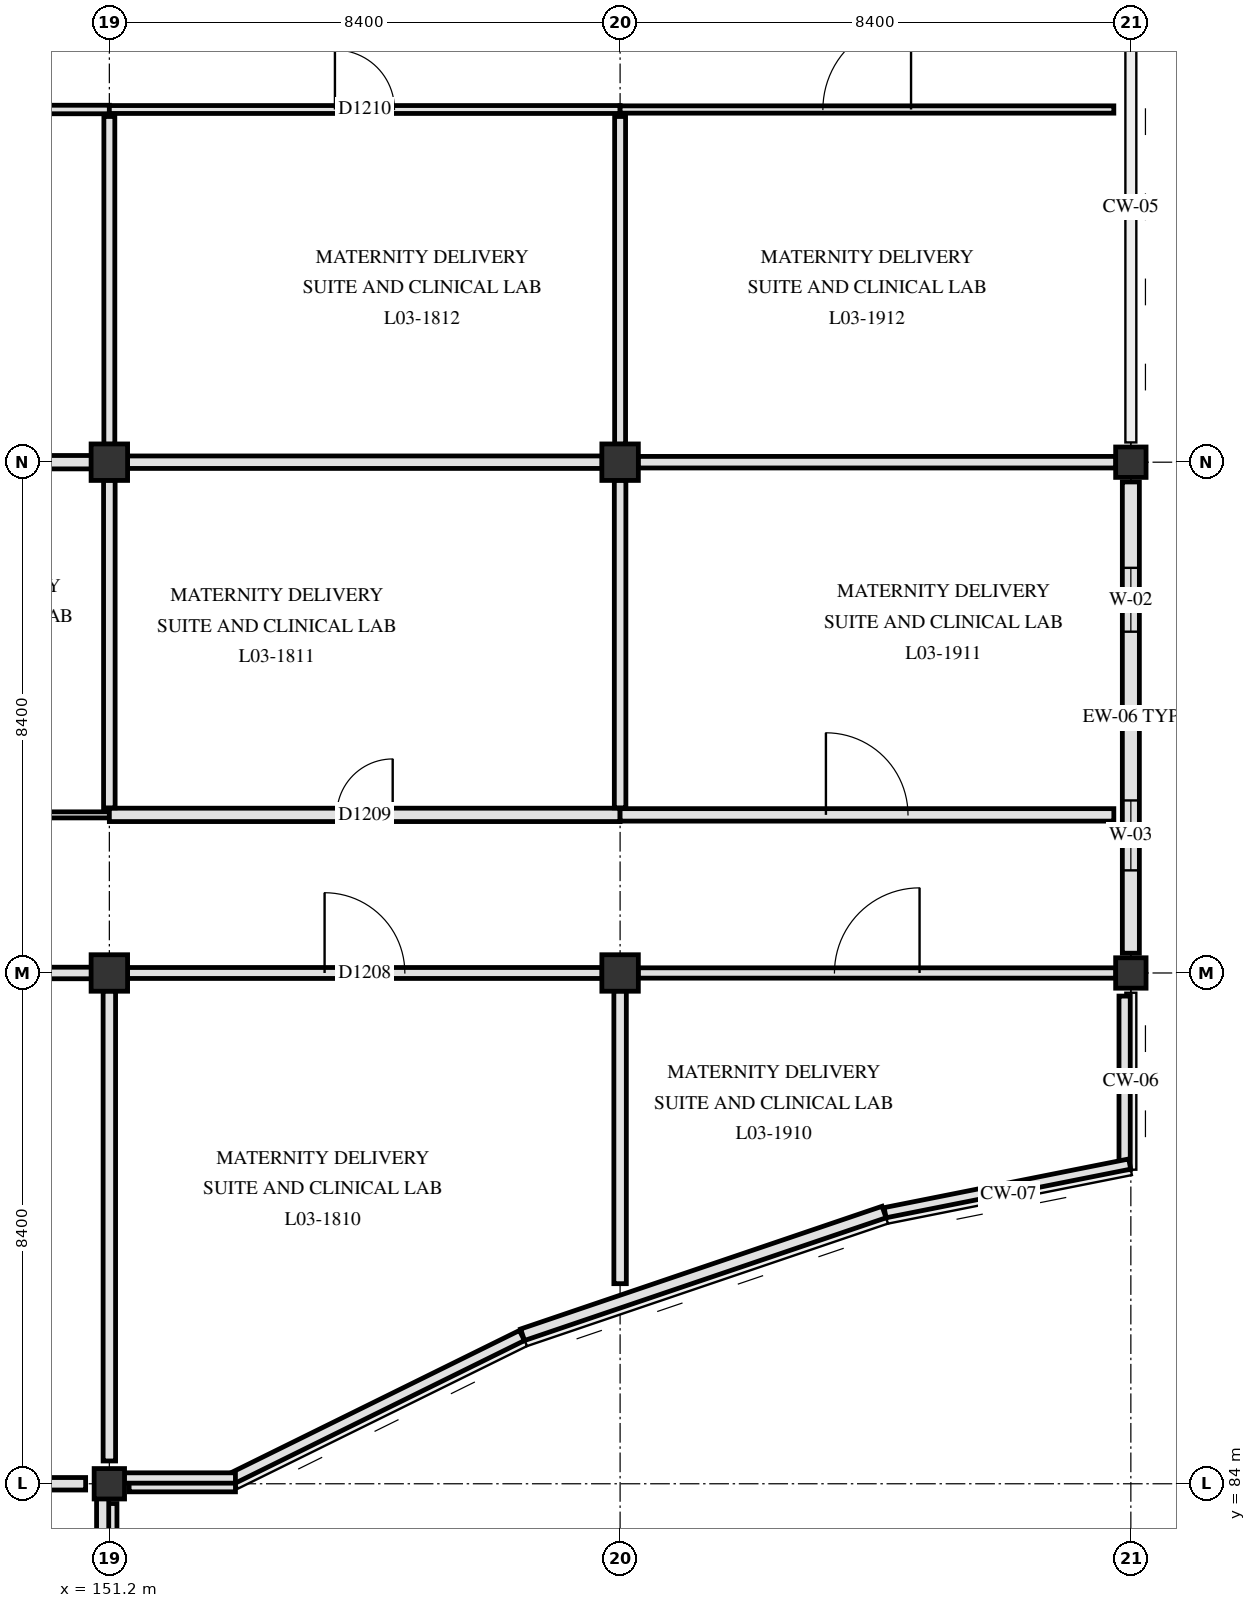
"""IFC4 building model, lengths in metres.
Left out: names, types, materials, properties, quantities, classifications, styles, units other than length and angle.
Written with IfcOpenShell. Run it as: python <this file> out.ifc"""

import sys

from ifc_helpers import new_model, si_unit, direction, frame, frame_2d, origin, origin_2d, place, context, subcontext, project, spatial, rectangle, extrude, element, fill, save


model = new_model("IFC4")
c1 = context("Model", 3, precision=1e-05, world=origin(), true_north=direction((0.0, 1.0)))
c2 = subcontext(c1, "Body", "Model", "MODEL_VIEW")
j1 = project(units=[si_unit("LENGTHUNIT", "METRE"), si_unit("PLANEANGLEUNIT", "RADIAN")], contexts=[c1])
p1 = place(None, origin())
s1 = spatial("IfcSite", under=j1, at=p1, CompositionType="ELEMENT")
p2 = place(p1, origin())
s2 = spatial("IfcBuilding", under=s1, at=p2, CompositionType="ELEMENT")
p3 = place(p2, frame((0.0, 0.0, 14.4)))
s3 = spatial("IfcBuildingStorey", under=s2, at=p3, CompositionType="ELEMENT", Elevation=14.4)
p4 = place(p3, frame((151.2, 84.0, 0.0), z_axis=(0.0, 0.0, 1.0), x_axis=(1.0, 0.0, 0.0)))
e1 = element("IfcColumn", 1, at=p4, inside=s3, PredefinedType="COLUMN", context=c2, shape_type="SweptSolid", body=[
    extrude(rectangle(XDim=0.5, YDim=0.5, at=origin_2d()), origin(), (0.0, 0.0, 1.0), 4.2),
])
for number, where, z_axis, x_axis in (
    (2, (151.2, 92.4, 0.0), (0.0, 0.0, 1.0), (1.0, 0.0, 0.0)),
    (3, (151.2, 100.8, 0.0), (0.0, 0.0, 1.0), (1.0, 0.0, 0.0)),
    (4, (159.6, 92.4, 0.0), (0.0, 0.0, 1.0), (1.0, 0.0, 0.0)),
    (5, (159.6, 100.8, 0.0), (0.0, 0.0, 1.0), (1.0, 0.0, 0.0)),
):
    element("IfcColumn", number, at=place(p3, frame(where, z_axis=z_axis, x_axis=x_axis)), inside=s3, PredefinedType="COLUMN", context=c2, shape_type="SweptSolid", body=[
        extrude(rectangle(XDim=0.6, YDim=0.6, at=origin_2d()), origin(), (0.0, 0.0, 1.0), 4.2),
    ])
for number, where, z_axis, x_axis in (
    (6, (168.0, 92.4, 0.0), (0.0, 0.0, 1.0), (1.0, 0.0, 0.0)),
    (7, (168.0, 100.8, 0.0), (0.0, 0.0, 1.0), (1.0, 0.0, 0.0)),
):
    element("IfcColumn", number, at=place(p3, frame(where, z_axis=z_axis, x_axis=x_axis)), inside=s3, PredefinedType="COLUMN", context=c2, shape_type="SweptSolid", body=[
        extrude(rectangle(XDim=0.5, YDim=0.5, at=origin_2d()), origin(), (0.0, 0.0, 1.0), 4.2),
    ])
p5 = place(p3, frame((168.0, 100.475, 0.0), z_axis=(0.0, 0.0, 1.0), x_axis=(0.0, -1.0, 0.0)))
e8 = element("IfcWall", 8, at=p5, inside=s3, PredefinedType="SOLIDWALL", context=c2, shape_type="SweptSolid", body=[
    extrude(rectangle(XDim=7.75, YDim=0.28, at=frame_2d((3.875, 0.0))), origin(), (0.0, 0.0, 1.0), 2.89),
])
p6 = place(p5, frame((1.413, 0.0, 0.85)))
e9 = element("IfcOpeningElement", 9, at=p6, cuts=e8, PredefinedType="OPENING", context=c2, shape_type="SweptSolid", body=[
    extrude(rectangle(XDim=1.05, YDim=1.3, at=frame_2d((0.525, 0.65))), frame((0.0, 0.15, 0.0), z_axis=(0.0, -1.0, 0.0), x_axis=(1.0, 0.0, 0.0)), (0.0, 0.0, 1.0), 0.3),
])
p7 = place(p5, frame((5.238, 0.0, 0.85)))
e10 = element("IfcOpeningElement", 10, at=p7, cuts=e8, PredefinedType="OPENING", context=c2, shape_type="SweptSolid", body=[
    extrude(rectangle(XDim=1.15, YDim=1.3, at=frame_2d((0.575, 0.65))), frame((0.0, 0.15, 0.0), z_axis=(0.0, -1.0, 0.0), x_axis=(1.0, 0.0, 0.0)), (0.0, 0.0, 1.0), 0.3),
])
p8 = place(p3, frame((153.274, 84.0, 0.0), z_axis=(0.0, 0.0, 1.0), x_axis=(-1.0, 0.0, 0.0)))
e11 = element("IfcWall", 11, at=p8, inside=s3, PredefinedType="SOLIDWALL", context=c2, shape_type="SweptSolid", body=[
    extrude(rectangle(XDim=1.749, YDim=0.265, at=frame_2d((0.875, 0.0))), origin(), (0.0, 0.0, 1.0), 3.89),
])
p9 = place(p3, frame((151.2, 83.675, 0.0), z_axis=(0.0, 0.0, 1.0), x_axis=(0.0, -1.0, 0.0)))
e12 = element("IfcWall", 12, at=p9, inside=s3, PredefinedType="SOLIDWALL", context=c2, shape_type="SweptSolid", body=[
    extrude(rectangle(XDim=0.908, YDim=0.25, at=frame_2d((0.454, 0.0))), origin(), (0.0, 0.0, 1.0), 3.89),
])
p10 = place(p3, frame((167.897, 92.02, 4.18), z_axis=(0.0, 0.0, 1.0), x_axis=(0.0, -1.0, 0.0)))
e13 = element("IfcWall", 13, at=p10, inside=s3, PredefinedType="PARAPET", context=c2, shape_type="SweptSolid", body=[
    extrude(rectangle(XDim=2.855, YDim=0.185, at=frame_2d((1.428, 0.0))), origin(), (0.0, 0.0, 1.0), 1.17),
])
p11 = place(p3, frame((167.981, 89.258, 4.18), z_axis=(0.0, 0.0, 1.0), x_axis=(-0.980783878523, -0.19509736961, 0.0)))
e14 = element("IfcWall", 14, at=p11, inside=s3, PredefinedType="PARAPET", context=c2, shape_type="SweptSolid", body=[
    extrude(rectangle(XDim=4.102, YDim=0.17, at=frame_2d((2.051, 0.0))), origin(), (0.0, 0.0, 1.0), 1.17),
])
p12 = place(p3, frame((163.941, 88.469, 4.18), z_axis=(0.0, 0.0, 1.0), x_axis=(-0.946938763932, -0.32141402795, 0.0)))
e15 = element("IfcWall", 15, at=p12, inside=s3, PredefinedType="PARAPET", context=c2, shape_type="SweptSolid", body=[
    extrude(rectangle(XDim=6.279, YDim=0.2, at=frame_2d((3.139, 0.0))), origin(), (0.0, 0.0, 1.0), 1.17),
])
p13 = place(p3, frame((157.986, 86.438, 4.18), z_axis=(0.0, 0.0, 1.0), x_axis=(-0.896871370763, -0.442291469854, 0.0)))
e16 = element("IfcWall", 16, at=p13, inside=s3, PredefinedType="PARAPET", context=c2, shape_type="SweptSolid", body=[
    extrude(rectangle(XDim=5.305, YDim=0.185, at=frame_2d((2.652, 0.0))), origin(), (0.0, 0.0, 1.0), 1.17),
])
p14 = place(p3, frame((153.274, 84.095, 4.18), z_axis=(0.0, 0.0, 1.0), x_axis=(-1.0, 0.0, 0.0)))
e17 = element("IfcWall", 17, at=p14, inside=s3, PredefinedType="PARAPET", context=c2, shape_type="SweptSolid", body=[
    extrude(rectangle(XDim=2.074, YDim=0.17, at=frame_2d((1.037, 0.0))), origin(), (0.0, 0.0, 1.0), 1.17),
])
p15 = place(p3, frame((151.09, 84.0, 4.18), z_axis=(0.0, 0.0, 1.0), x_axis=(0.0, -1.0, 0.0)))
e18 = element("IfcWall", 18, at=p15, inside=s3, PredefinedType="PARAPET", context=c2, shape_type="SweptSolid", body=[
    extrude(rectangle(XDim=1.233, YDim=0.2, at=frame_2d((0.616, 0.0))), origin(), (0.0, 0.0, 1.0), 1.17),
])
p16 = place(p3, frame((143.045, 84.0, 0.0), z_axis=(0.0, 0.0, 1.0), x_axis=(1.0, 0.0, 0.0)))
e19 = element("IfcWall", 19, at=p16, inside=s3, PredefinedType="PARTITIONING", context=c2, shape_type="SweptSolid", body=[
    extrude(rectangle(XDim=7.765, YDim=0.205, at=frame_2d((3.883, 0.0))), origin(), (0.0, 0.0, 1.0), 3.29),
])
p17 = place(p16, frame((3.258, 0.0, 0.0)))
e20 = element("IfcOpeningElement", 20, at=p17, cuts=e19, PredefinedType="OPENING", context=c2, shape_type="SweptSolid", body=[
    extrude(rectangle(XDim=1.25, YDim=2.2, at=frame_2d((0.625, 1.1))), frame((0.0, 0.113, 0.0), z_axis=(0.0, -1.0, 0.0), x_axis=(1.0, 0.0, 0.0)), (0.0, 0.0, 1.0), 0.225),
])
p18 = place(p3, frame((143.095, 92.4, 0.0), z_axis=(0.0, 0.0, 1.0), x_axis=(1.0, 0.0, 0.0)))
e21 = element("IfcWall", 21, at=p18, inside=s3, PredefinedType="PARTITIONING", context=c2, shape_type="SweptSolid", body=[
    extrude(rectangle(XDim=7.81, YDim=0.19, at=frame_2d((3.905, 0.0))), origin(), (0.0, 0.0, 1.0), 2.89),
])
p19 = place(p18, frame((3.255, 0.0, 0.0)))
e22 = element("IfcOpeningElement", 22, at=p19, cuts=e21, PredefinedType="OPENING", context=c2, shape_type="SweptSolid", body=[
    extrude(rectangle(XDim=1.3, YDim=2.2, at=frame_2d((0.65, 1.1))), frame((0.0, 0.105, 0.0), z_axis=(0.0, -1.0, 0.0), x_axis=(1.0, 0.0, 0.0)), (0.0, 0.0, 1.0), 0.21),
])
p20 = place(p3, frame((151.495, 92.4, 0.0), z_axis=(0.0, 0.0, 1.0), x_axis=(1.0, 0.0, 0.0)))
e23 = element("IfcWall", 23, at=p20, inside=s3, PredefinedType="PARTITIONING", context=c2, shape_type="SweptSolid", body=[
    extrude(rectangle(XDim=7.81, YDim=0.18, at=frame_2d((3.905, 0.0))), origin(), (0.0, 0.0, 1.0), 2.89),
])
p21 = place(p20, frame((3.245, 0.0, 0.0)))
e24 = element("IfcOpeningElement", 24, at=p21, cuts=e23, PredefinedType="OPENING", context=c2, shape_type="SweptSolid", body=[
    extrude(rectangle(XDim=1.32, YDim=2.18, at=frame_2d((0.66, 1.09))), frame((0.0, 0.1, 0.0), z_axis=(0.0, -1.0, 0.0), x_axis=(1.0, 0.0, 0.0)), (0.0, 0.0, 1.0), 0.2),
])
p22 = place(p3, frame((159.895, 92.4, 0.0), z_axis=(0.0, 0.0, 1.0), x_axis=(1.0, 0.0, 0.0)))
e25 = element("IfcWall", 25, at=p22, inside=s3, PredefinedType="PARTITIONING", context=c2, shape_type="SweptSolid", body=[
    extrude(rectangle(XDim=7.86, YDim=0.17, at=frame_2d((3.93, 0.0))), origin(), (0.0, 0.0, 1.0), 2.89),
])
p23 = place(p22, frame((3.23, 0.0, 0.0)))
e26 = element("IfcOpeningElement", 26, at=p23, cuts=e25, PredefinedType="OPENING", context=c2, shape_type="SweptSolid", body=[
    extrude(rectangle(XDim=1.4, YDim=2.2, at=frame_2d((0.7, 1.1))), frame((0.0, 0.095, 0.0), z_axis=(0.0, -1.0, 0.0), x_axis=(1.0, 0.0, 0.0)), (0.0, 0.0, 1.0), 0.19),
])
p24 = place(p3, frame((142.8, 95.0, 0.0), z_axis=(0.0, 0.0, 1.0), x_axis=(1.0, 0.0, 0.0)))
e27 = element("IfcWall", 27, at=p24, inside=s3, PredefinedType="PARTITIONING", context=c2, shape_type="SweptSolid", body=[
    extrude(rectangle(XDim=8.4, YDim=0.1, at=frame_2d((4.2, 0.0))), origin(), (0.0, 0.0, 1.0), 3.34),
])
p25 = place(p24, frame((3.46, 0.0, 0.0)))
e28 = element("IfcOpeningElement", 28, at=p25, cuts=e27, PredefinedType="OPENING", context=c2, shape_type="SweptSolid", body=[
    extrude(rectangle(XDim=1.48, YDim=2.22, at=frame_2d((0.74, 1.11))), frame((0.0, 0.06, 0.0), z_axis=(0.0, -1.0, 0.0), x_axis=(1.0, 0.0, 0.0)), (0.0, 0.0, 1.0), 0.12),
])
p26 = place(p3, frame((151.2, 95.0, 0.0), z_axis=(0.0, 0.0, 1.0), x_axis=(1.0, 0.0, 0.0)))
e29 = element("IfcWall", 29, at=p26, inside=s3, PredefinedType="PARTITIONING", context=c2, shape_type="SweptSolid", body=[
    extrude(rectangle(XDim=8.4, YDim=0.22, at=frame_2d((4.2, 0.0))), origin(), (0.0, 0.0, 1.0), 3.34),
])
p27 = place(p26, frame((3.74, 0.0, 0.0)))
e30 = element("IfcOpeningElement", 30, at=p27, cuts=e29, PredefinedType="OPENING", context=c2, shape_type="SweptSolid", body=[
    extrude(rectangle(XDim=0.92, YDim=2.08, at=frame_2d((0.46, 1.04))), frame((0.0, 0.12, 0.0), z_axis=(0.0, -1.0, 0.0), x_axis=(1.0, 0.0, 0.0)), (0.0, 0.0, 1.0), 0.24),
])
p28 = place(p3, frame((159.6, 95.0, 0.0), z_axis=(0.0, 0.0, 1.0), x_axis=(1.0, 0.0, 0.0)))
e31 = element("IfcWall", 31, at=p28, inside=s3, PredefinedType="PARTITIONING", context=c2, shape_type="SweptSolid", body=[
    extrude(rectangle(XDim=8.12, YDim=0.205, at=frame_2d((4.06, 0.0))), origin(), (0.0, 0.0, 1.0), 2.89),
])
p29 = place(p28, frame((3.385, 0.0, 0.0)))
e32 = element("IfcOpeningElement", 32, at=p29, cuts=e31, PredefinedType="OPENING", context=c2, shape_type="SweptSolid", body=[
    extrude(rectangle(XDim=1.35, YDim=2.2, at=frame_2d((0.675, 1.1))), frame((0.0, 0.113, 0.0), z_axis=(0.0, -1.0, 0.0), x_axis=(1.0, 0.0, 0.0)), (0.0, 0.0, 1.0), 0.225),
])
p30 = place(p3, frame((143.095, 100.8, 0.0), z_axis=(0.0, 0.0, 1.0), x_axis=(1.0, 0.0, 0.0)))
e33 = element("IfcWall", 33, at=p30, inside=s3, PredefinedType="PARTITIONING", context=c2, shape_type="SweptSolid", body=[
    extrude(rectangle(XDim=7.81, YDim=0.22, at=frame_2d((3.905, 0.0))), origin(), (0.0, 0.0, 1.0), 3.29),
])
p31 = place(p3, frame((151.495, 100.8, 0.0), z_axis=(0.0, 0.0, 1.0), x_axis=(1.0, 0.0, 0.0)))
e34 = element("IfcWall", 34, at=p31, inside=s3, PredefinedType="PARTITIONING", context=c2, shape_type="SweptSolid", body=[
    extrude(rectangle(XDim=7.81, YDim=0.205, at=frame_2d((3.905, 0.0))), origin(), (0.0, 0.0, 1.0), 3.29),
])
p32 = place(p3, frame((159.895, 100.8, 0.0), z_axis=(0.0, 0.0, 1.0), x_axis=(1.0, 0.0, 0.0)))
e35 = element("IfcWall", 35, at=p32, inside=s3, PredefinedType="PARTITIONING", context=c2, shape_type="SweptSolid", body=[
    extrude(rectangle(XDim=7.86, YDim=0.19, at=frame_2d((3.93, 0.0))), origin(), (0.0, 0.0, 1.0), 3.29),
])
p33 = place(p3, frame((142.8, 106.6, 0.0), z_axis=(0.0, 0.0, 1.0), x_axis=(1.0, 0.0, 0.0)))
e36 = element("IfcWall", 36, at=p33, inside=s3, PredefinedType="PARTITIONING", context=c2, shape_type="SweptSolid", body=[
    extrude(rectangle(XDim=8.4, YDim=0.14, at=frame_2d((4.2, 0.0))), origin(), (0.0, 0.0, 1.0), 3.34),
])
p34 = place(p33, frame((3.43, 0.0, 0.0)))
e37 = element("IfcOpeningElement", 37, at=p34, cuts=e36, PredefinedType="OPENING", context=c2, shape_type="SweptSolid", body=[
    extrude(rectangle(XDim=1.54, YDim=2.24, at=frame_2d((0.77, 1.12))), frame((0.0, 0.08, 0.0), z_axis=(0.0, -1.0, 0.0), x_axis=(1.0, 0.0, 0.0)), (0.0, 0.0, 1.0), 0.16),
])
p35 = place(p3, frame((151.2, 106.6, 0.0), z_axis=(0.0, 0.0, 1.0), x_axis=(1.0, 0.0, 0.0)))
e38 = element("IfcWall", 38, at=p35, inside=s3, PredefinedType="PARTITIONING", context=c2, shape_type="SweptSolid", body=[
    extrude(rectangle(XDim=8.4, YDim=0.13, at=frame_2d((4.2, 0.0))), origin(), (0.0, 0.0, 1.0), 3.34),
])
p36 = place(p35, frame((3.71, 0.0, 0.0)))
e39 = element("IfcOpeningElement", 39, at=p36, cuts=e38, PredefinedType="OPENING", context=c2, shape_type="SweptSolid", body=[
    extrude(rectangle(XDim=0.98, YDim=2.12, at=frame_2d((0.49, 1.06))), frame((0.0, 0.075, 0.0), z_axis=(0.0, -1.0, 0.0), x_axis=(1.0, 0.0, 0.0)), (0.0, 0.0, 1.0), 0.15),
])
p37 = place(p3, frame((159.6, 106.6, 0.0), z_axis=(0.0, 0.0, 1.0), x_axis=(1.0, 0.0, 0.0)))
e40 = element("IfcWall", 40, at=p37, inside=s3, PredefinedType="PARTITIONING", context=c2, shape_type="SweptSolid", body=[
    extrude(rectangle(XDim=8.12, YDim=0.12, at=frame_2d((4.06, 0.0))), origin(), (0.0, 0.0, 1.0), 2.89),
])
p38 = place(p37, frame((3.335, 0.0, 0.0)))
e41 = element("IfcOpeningElement", 41, at=p38, cuts=e40, PredefinedType="OPENING", context=c2, shape_type="SweptSolid", body=[
    extrude(rectangle(XDim=1.45, YDim=2.2, at=frame_2d((0.725, 1.1))), frame((0.0, 0.07, 0.0), z_axis=(0.0, -1.0, 0.0), x_axis=(1.0, 0.0, 0.0)), (0.0, 0.0, 1.0), 0.14),
])
p39 = place(p3, frame((151.2, 84.375, 0.0), z_axis=(0.0, 0.0, 1.0), x_axis=(0.0, 1.0, 0.0)))
e42 = element("IfcWall", 42, at=p39, inside=s3, PredefinedType="PARTITIONING", context=c2, shape_type="SweptSolid", body=[
    extrude(rectangle(XDim=7.73, YDim=0.205, at=frame_2d((3.865, 0.0))), origin(), (0.0, 0.0, 1.0), 3.34),
])
p40 = place(p3, frame((151.2, 95.115, 0.0), z_axis=(0.0, 0.0, 1.0), x_axis=(0.0, 1.0, 0.0)))
e43 = element("IfcWall", 43, at=p40, inside=s3, PredefinedType="PARTITIONING", context=c2, shape_type="SweptSolid", body=[
    extrude(rectangle(XDim=5.39, YDim=0.19, at=frame_2d((2.695, 0.0))), origin(), (0.0, 0.0, 1.0), 3.34),
])
p41 = place(p3, frame((151.2, 101.095, 0.0), z_axis=(0.0, 0.0, 1.0), x_axis=(0.0, 1.0, 0.0)))
e44 = element("IfcWall", 44, at=p41, inside=s3, PredefinedType="PARTITIONING", context=c2, shape_type="SweptSolid", body=[
    extrude(rectangle(XDim=5.39, YDim=0.18, at=frame_2d((2.695, 0.0))), origin(), (0.0, 0.0, 1.0), 3.34),
])
p42 = place(p3, frame((159.6, 87.291, 0.0), z_axis=(0.0, 0.0, 1.0), x_axis=(0.0, 1.0, 0.0)))
e45 = element("IfcWall", 45, at=p42, inside=s3, PredefinedType="PARTITIONING", context=c2, shape_type="SweptSolid", body=[
    extrude(rectangle(XDim=4.814, YDim=0.205, at=frame_2d((2.407, 0.0))), origin(), (0.0, 0.0, 1.0), 3.89),
])
p43 = place(p3, frame((159.6, 95.115, 0.0), z_axis=(0.0, 0.0, 1.0), x_axis=(0.0, 1.0, 0.0)))
e46 = element("IfcWall", 46, at=p43, inside=s3, PredefinedType="PARTITIONING", context=c2, shape_type="SweptSolid", body=[
    extrude(rectangle(XDim=5.39, YDim=0.19, at=frame_2d((2.695, 0.0))), origin(), (0.0, 0.0, 1.0), 3.34),
])
p44 = place(p3, frame((159.6, 101.095, 0.0), z_axis=(0.0, 0.0, 1.0), x_axis=(0.0, 1.0, 0.0)))
e47 = element("IfcWall", 47, at=p44, inside=s3, PredefinedType="PARTITIONING", context=c2, shape_type="SweptSolid", body=[
    extrude(rectangle(XDim=5.39, YDim=0.18, at=frame_2d((2.695, 0.0))), origin(), (0.0, 0.0, 1.0), 3.34),
])
p45 = place(p6, origin())
e48 = element("IfcWindow", 48, at=p45, inside=s3, PartitioningType="SINGLE_PANEL", PredefinedType="WINDOW", context=c2, shape_type="SweptSolid", body=[
    extrude(rectangle(XDim=1.05, YDim=1.3, at=frame_2d((0.525, 0.65))), frame((0.0, 0.03, 0.0), z_axis=(0.0, -1.0, 0.0), x_axis=(1.0, 0.0, 0.0)), (0.0, 0.0, 1.0), 0.06),
])
fill(e9, e48)
p46 = place(p7, origin())
e49 = element("IfcWindow", 49, at=p46, inside=s3, PartitioningType="SINGLE_PANEL", PredefinedType="WINDOW", context=c2, shape_type="SweptSolid", body=[
    extrude(rectangle(XDim=1.15, YDim=1.3, at=frame_2d((0.575, 0.65))), frame((0.0, 0.03, 0.0), z_axis=(0.0, -1.0, 0.0), x_axis=(1.0, 0.0, 0.0)), (0.0, 0.0, 1.0), 0.06),
])
fill(e10, e49)
p47 = place(p21, origin())
e50 = element("IfcDoor", 50, at=p47, inside=s3, OperationType="SINGLE_SWING_LEFT", PredefinedType="DOOR", context=c2, shape_type="SweptSolid", body=[
    extrude(rectangle(XDim=1.32, YDim=2.18, at=frame_2d((0.66, 1.09))), frame((0.0, 0.025, 0.0), z_axis=(0.0, -1.0, 0.0), x_axis=(1.0, 0.0, 0.0)), (0.0, 0.0, 1.0), 0.05),
])
fill(e24, e50)
p48 = place(p27, origin())
e51 = element("IfcDoor", 51, at=p48, inside=s3, OperationType="SINGLE_SWING_RIGHT", PredefinedType="DOOR", context=c2, shape_type="SweptSolid", body=[
    extrude(rectangle(XDim=0.92, YDim=2.08, at=frame_2d((0.46, 1.04))), frame((0.0, 0.025, 0.0), z_axis=(0.0, -1.0, 0.0), x_axis=(1.0, 0.0, 0.0)), (0.0, 0.0, 1.0), 0.05),
])
fill(e30, e51)
p49 = place(p36, origin())
e52 = element("IfcDoor", 52, at=p49, inside=s3, OperationType="SINGLE_SWING_LEFT", PredefinedType="DOOR", context=c2, shape_type="SweptSolid", body=[
    extrude(rectangle(XDim=0.98, YDim=2.12, at=frame_2d((0.49, 1.06))), frame((0.0, 0.025, 0.0), z_axis=(0.0, -1.0, 0.0), x_axis=(1.0, 0.0, 0.0)), (0.0, 0.0, 1.0), 0.05),
])
fill(e39, e52)
p50 = place(p23, origin())
e53 = element("IfcDoor", 53, at=p50, inside=s3, OperationType="SINGLE_SWING_RIGHT", PredefinedType="DOOR", context=c2, shape_type="SweptSolid", body=[
    extrude(rectangle(XDim=1.4, YDim=2.2, at=frame_2d((0.7, 1.1))), frame((0.0, 0.025, 0.0), z_axis=(0.0, -1.0, 0.0), x_axis=(1.0, 0.0, 0.0)), (0.0, 0.0, 1.0), 0.05),
])
fill(e26, e53)
p51 = place(p29, origin())
e54 = element("IfcDoor", 54, at=p51, inside=s3, OperationType="SINGLE_SWING_LEFT", PredefinedType="DOOR", context=c2, shape_type="SweptSolid", body=[
    extrude(rectangle(XDim=1.35, YDim=2.2, at=frame_2d((0.675, 1.1))), frame((0.0, 0.025, 0.0), z_axis=(0.0, -1.0, 0.0), x_axis=(1.0, 0.0, 0.0)), (0.0, 0.0, 1.0), 0.05),
])
fill(e32, e54)
p52 = place(p38, origin())
e55 = element("IfcDoor", 55, at=p52, inside=s3, OperationType="SINGLE_SWING_RIGHT", PredefinedType="DOOR", context=c2, shape_type="SweptSolid", body=[
    extrude(rectangle(XDim=1.45, YDim=2.2, at=frame_2d((0.725, 1.1))), frame((0.0, 0.025, 0.0), z_axis=(0.0, -1.0, 0.0), x_axis=(1.0, 0.0, 0.0)), (0.0, 0.0, 1.0), 0.05),
])
fill(e41, e55)
save(model, sys.argv[1])
